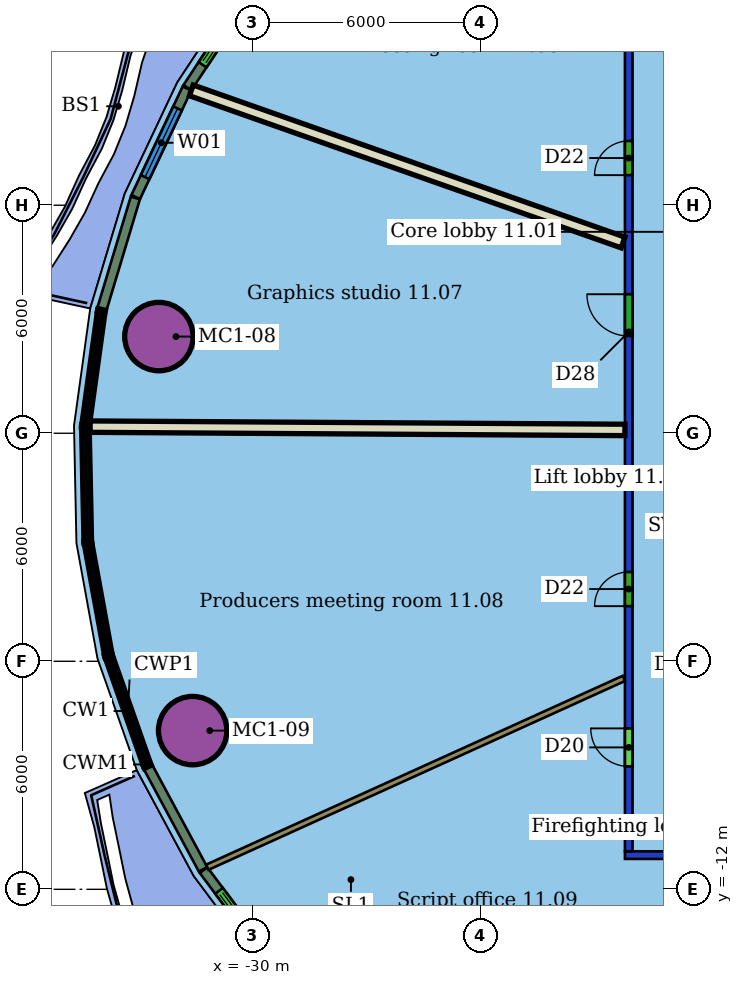
"""IFC4 building model, lengths in metres.
Left out: names, types, materials, properties, quantities, classifications, styles, units other than length and angle.
Written with IfcOpenShell. Run it as: python <this file> out.ifc"""

import sys

from ifc_helpers import new_model, si_unit, direction, frame, frame_2d, origin, origin_2d, place, context, subcontext, project, spatial, rectangle, hollow_circle, extrude, element, fill, save


model = new_model("IFC4")
c1 = context("Model", 3, precision=1e-05, world=origin(), true_north=direction((0.0, 1.0)))
c2 = subcontext(c1, "Body", "Model", "MODEL_VIEW")
j1 = project(units=[si_unit("LENGTHUNIT", "METRE"), si_unit("PLANEANGLEUNIT", "RADIAN")], contexts=[c1])
p1 = place(None, origin())
s1 = spatial("IfcSite", under=j1, at=p1, CompositionType="ELEMENT")
p2 = place(p1, origin())
s2 = spatial("IfcBuilding", under=s1, at=p2, CompositionType="ELEMENT")
p3 = place(p2, frame((0.0, 0.0, 58.2)))
s3 = spatial("IfcBuildingStorey", under=s2, at=p3, CompositionType="ELEMENT", Elevation=58.2)
for number, where, z_axis, x_axis in (
    (1, (-32.464, 2.543, 0.0), (0.0, 0.0, 1.0), (1.0, 0.0, 0.0)),
    (2, (-31.575, -7.824, 0.0), (0.0, 0.0, 1.0), (1.0, 0.0, 0.0)),
):
    element("IfcColumn", number, at=place(p3, frame(where, z_axis=z_axis, x_axis=x_axis)), inside=s3, PredefinedType="COLUMN", context=c2, shape_type="SweptSolid", body=[
        extrude(hollow_circle(Radius=0.9, WallThickness=0.06, at=origin_2d()), origin(), (0.0, 0.0, 1.0), 3.55),
    ])
p4 = place(p3, frame((8.2, -11.1, 0.0), z_axis=(0.0, 0.0, 1.0), x_axis=(-1.0, 0.0, 0.0)))
e3 = element("IfcWall", 3, at=p4, inside=s3, PredefinedType="PARTITIONING", context=c2, shape_type="SweptSolid", body=[
    extrude(rectangle(XDim=28.4, YDim=0.2, at=frame_2d((14.2, 0.0))), origin(), (0.0, 0.0, 1.0), 2.85),
])
p5 = place(p4, frame((20.481, 0.0, 0.0)))
e4 = element("IfcOpeningElement", 4, at=p5, cuts=e3, PredefinedType="OPENING", context=c2, shape_type="SweptSolid", body=[
    extrude(rectangle(XDim=1.1, YDim=2.1, at=frame_2d((0.55, 1.05))), frame((0.0, 0.11, 0.0), z_axis=(0.0, -1.0, 0.0), x_axis=(1.0, 0.0, 0.0)), (0.0, 0.0, 1.0), 0.22),
])
p6 = place(p4, frame((15.652, 0.0, 0.0)))
e5 = element("IfcOpeningElement", 5, at=p6, cuts=e3, PredefinedType="OPENING", context=c2, shape_type="SweptSolid", body=[
    extrude(rectangle(XDim=1.5, YDim=2.1, at=frame_2d((0.75, 1.05))), frame((0.0, 0.11, 0.0), z_axis=(0.0, -1.0, 0.0), x_axis=(1.0, 0.0, 0.0)), (0.0, 0.0, 1.0), 0.22),
])
p7 = place(p4, frame((7.719, 0.0, 0.0)))
e6 = element("IfcOpeningElement", 6, at=p7, cuts=e3, PredefinedType="OPENING", context=c2, shape_type="SweptSolid", body=[
    extrude(rectangle(XDim=1.8, YDim=2.1, at=frame_2d((0.9, 1.05))), frame((0.0, 0.11, 0.0), z_axis=(0.0, -1.0, 0.0), x_axis=(1.0, 0.0, 0.0)), (0.0, 0.0, 1.0), 0.22),
])
p8 = place(p3, frame((-20.1, -11.0, 0.0), z_axis=(0.0, 0.0, 1.0), x_axis=(0.0, 1.0, 0.0)))
e7 = element("IfcWall", 7, at=p8, inside=s3, PredefinedType="PARTITIONING", context=c2, shape_type="SweptSolid", body=[
    extrude(rectangle(XDim=22.0, YDim=0.2, at=frame_2d((11.0, 0.0))), origin(), (0.0, 0.0, 1.0), 2.85),
])
p9 = place(p8, frame((17.792, 0.0, 0.0)))
e8 = element("IfcOpeningElement", 8, at=p9, cuts=e7, PredefinedType="OPENING", context=c2, shape_type="SweptSolid", body=[
    extrude(rectangle(XDim=0.9, YDim=2.1, at=frame_2d((0.45, 1.05))), frame((0.0, 0.11, 0.0), z_axis=(0.0, -1.0, 0.0), x_axis=(1.0, 0.0, 0.0)), (0.0, 0.0, 1.0), 0.22),
])
p10 = place(p8, frame((13.558, 0.0, 0.0)))
e9 = element("IfcOpeningElement", 9, at=p10, cuts=e7, PredefinedType="OPENING", context=c2, shape_type="SweptSolid", body=[
    extrude(rectangle(XDim=1.1, YDim=2.1, at=frame_2d((0.55, 1.05))), frame((0.0, 0.11, 0.0), z_axis=(0.0, -1.0, 0.0), x_axis=(1.0, 0.0, 0.0)), (0.0, 0.0, 1.0), 0.22),
])
p11 = place(p8, frame((6.45, 0.0, 0.0)))
e10 = element("IfcOpeningElement", 10, at=p11, cuts=e7, PredefinedType="OPENING", context=c2, shape_type="SweptSolid", body=[
    extrude(rectangle(XDim=0.9, YDim=2.1, at=frame_2d((0.45, 1.05))), frame((0.0, 0.11, 0.0), z_axis=(0.0, -1.0, 0.0), x_axis=(1.0, 0.0, 0.0)), (0.0, 0.0, 1.0), 0.22),
])
p12 = place(p8, frame((2.234, 0.0, 0.0)))
e11 = element("IfcOpeningElement", 11, at=p12, cuts=e7, PredefinedType="OPENING", context=c2, shape_type="SweptSolid", body=[
    extrude(rectangle(XDim=1.0, YDim=2.1, at=frame_2d((0.5, 1.05))), frame((0.0, 0.11, 0.0), z_axis=(0.0, -1.0, 0.0), x_axis=(1.0, 0.0, 0.0)), (0.0, 0.0, 1.0), 0.22),
])
p13 = place(p3, frame((-31.611, 9.022, 0.0), z_axis=(0.0, 0.0, 1.0), x_axis=(0.943188110721, -0.332259217773, 0.0)))
e12 = element("IfcWall", 12, at=p13, inside=s3, PredefinedType="PARTITIONING", context=c2, shape_type="SweptSolid", body=[
    extrude(rectangle(XDim=12.045, YDim=0.3, at=frame_2d((6.023, 0.0))), origin(), (0.0, 0.0, 1.0), 3.55),
])
p14 = place(p3, frame((-34.274, 0.174, 0.0), z_axis=(0.0, 0.0, 1.0), x_axis=(0.999981035724, -0.006158586928, 0.0)))
e13 = element("IfcWall", 13, at=p14, inside=s3, PredefinedType="PARTITIONING", context=c2, shape_type="SweptSolid", body=[
    extrude(rectangle(XDim=14.073, YDim=0.3, at=frame_2d((7.037, 0.0))), origin(), (0.0, 0.0, 1.0), 3.55),
])
p15 = place(p3, frame((-31.19, -11.419, 0.0), z_axis=(0.0, 0.0, 1.0), x_axis=(0.91079054679, 0.412868719907, 0.0)))
e14 = element("IfcWall", 14, at=p15, inside=s3, PredefinedType="PARTITIONING", context=c2, shape_type="SweptSolid", body=[
    extrude(rectangle(XDim=12.033, YDim=0.15, at=frame_2d((6.017, 0.0))), origin(), (0.0, 0.0, 1.0), 3.55),
])
p16 = place(p3, frame((-24.339, -18.28, 0.0), z_axis=(0.0, 0.0, 1.0), x_axis=(0.708242772836, 0.705968961588, 0.0)))
e15 = element("IfcWall", 15, at=p16, inside=s3, PredefinedType="PARTITIONING", context=c2, shape_type="SweptSolid", body=[
    extrude(rectangle(XDim=9.878, YDim=0.3, at=frame_2d((4.939, 0.0))), origin(), (0.0, 0.0, 1.0), 3.55),
])
p17 = place(p3, frame((-29.926, 11.8, 0.0), z_axis=(0.0, 0.0, 1.0), x_axis=(-0.550976461362, -0.834520784058, 0.0)))
e16 = element("IfcWall", 16, at=p17, inside=s3, PredefinedType="SOLIDWALL", context=c2, shape_type="SweptSolid", body=[
    extrude(rectangle(XDim=3.243, YDim=0.25, at=frame_2d((1.621, 0.0))), origin(), (0.0, 0.0, 1.0), 3.15),
])
p18 = place(p17, frame((0.721, 0.0, 0.0)))
e17 = element("IfcOpeningElement", 17, at=p18, cuts=e16, PredefinedType="OPENING", context=c2, shape_type="SweptSolid", body=[
    extrude(rectangle(XDim=1.8, YDim=2.4, at=frame_2d((0.9, 1.2))), frame((0.0, 0.135, 0.0), z_axis=(0.0, -1.0, 0.0), x_axis=(1.0, 0.0, 0.0)), (0.0, 0.0, 1.0), 0.27),
])
p19 = place(p3, frame((-31.725, 9.072, 0.0), z_axis=(0.0, 0.0, 1.0), x_axis=(-0.427069496555, -0.904218803781, 0.0)))
e18 = element("IfcWall", 18, at=p19, inside=s3, PredefinedType="SOLIDWALL", context=c2, shape_type="SweptSolid", body=[
    extrude(rectangle(XDim=3.159, YDim=0.25, at=frame_2d((1.58, 0.0))), origin(), (0.0, 0.0, 1.0), 3.15),
])
p20 = place(p19, frame((0.58, 0.0, 0.8)))
e19 = element("IfcOpeningElement", 19, at=p20, cuts=e18, PredefinedType="OPENING", context=c2, shape_type="SweptSolid", body=[
    extrude(rectangle(XDim=2.0, YDim=2.2, at=frame_2d((1.0, 1.1))), frame((0.0, 0.135, 0.0), z_axis=(0.0, -1.0, 0.0), x_axis=(1.0, 0.0, 0.0)), (0.0, 0.0, 1.0), 0.27),
])
p21 = place(p3, frame((-33.084, 6.19, 0.0), z_axis=(0.0, 0.0, 1.0), x_axis=(-0.28804594388, -0.957616590403, 0.0)))
e20 = element("IfcWall", 20, at=p21, inside=s3, PredefinedType="SOLIDWALL", context=c2, shape_type="SweptSolid", body=[
    extrude(rectangle(XDim=3.048, YDim=0.25, at=frame_2d((1.524, 0.0))), origin(), (0.0, 0.0, 1.0), 3.15),
])
p22 = place(p3, frame((-32.745, -8.79, 0.0), z_axis=(0.0, 0.0, 1.0), x_axis=(0.473545649415, -0.880769276213, 0.0)))
e21 = element("IfcWall", 21, at=p22, inside=s3, PredefinedType="SOLIDWALL", context=c2, shape_type="SweptSolid", body=[
    extrude(rectangle(XDim=3.048, YDim=0.25, at=frame_2d((1.524, 0.0))), origin(), (0.0, 0.0, 1.0), 3.15),
])
p23 = place(p3, frame((-31.288, -11.497, 0.0), z_axis=(0.0, 0.0, 1.0), x_axis=(0.59907224047, -0.800694979813, 0.0)))
e22 = element("IfcWall", 22, at=p23, inside=s3, PredefinedType="SOLIDWALL", context=c2, shape_type="SweptSolid", body=[
    extrude(rectangle(XDim=3.159, YDim=0.25, at=frame_2d((1.58, 0.0))), origin(), (0.0, 0.0, 1.0), 3.15),
])
p24 = place(p23, frame((0.68, 0.0, 0.0)))
e23 = element("IfcOpeningElement", 23, at=p24, cuts=e22, PredefinedType="OPENING", context=c2, shape_type="SweptSolid", body=[
    extrude(rectangle(XDim=1.8, YDim=2.4, at=frame_2d((0.9, 1.2))), frame((0.0, 0.135, 0.0), z_axis=(0.0, -1.0, 0.0), x_axis=(1.0, 0.0, 0.0)), (0.0, 0.0, 1.0), 0.27),
])
p25 = place(p9, origin())
e24 = element("IfcDoor", 24, at=p25, inside=s3, OperationType="SINGLE_SWING_LEFT", PredefinedType="DOOR", context=c2, shape_type="SweptSolid", body=[
    extrude(rectangle(XDim=0.9, YDim=2.1, at=frame_2d((0.45, 1.05))), frame((0.0, 0.025, 0.0), z_axis=(0.0, -1.0, 0.0), x_axis=(1.0, 0.0, 0.0)), (0.0, 0.0, 1.0), 0.05),
])
fill(e8, e24)
p26 = place(p10, origin())
e25 = element("IfcDoor", 25, at=p26, inside=s3, OperationType="SINGLE_SWING_RIGHT", PredefinedType="DOOR", context=c2, shape_type="SweptSolid", body=[
    extrude(rectangle(XDim=1.1, YDim=2.1, at=frame_2d((0.55, 1.05))), frame((0.0, 0.025, 0.0), z_axis=(0.0, -1.0, 0.0), x_axis=(1.0, 0.0, 0.0)), (0.0, 0.0, 1.0), 0.05),
])
fill(e9, e25)
p27 = place(p11, origin())
e26 = element("IfcDoor", 26, at=p27, inside=s3, OperationType="SINGLE_SWING_LEFT", PredefinedType="DOOR", context=c2, shape_type="SweptSolid", body=[
    extrude(rectangle(XDim=0.9, YDim=2.1, at=frame_2d((0.45, 1.05))), frame((0.0, 0.025, 0.0), z_axis=(0.0, -1.0, 0.0), x_axis=(1.0, 0.0, 0.0)), (0.0, 0.0, 1.0), 0.05),
])
fill(e10, e26)
p28 = place(p12, origin())
e27 = element("IfcDoor", 27, at=p28, inside=s3, OperationType="SINGLE_SWING_RIGHT", PredefinedType="DOOR", context=c2, shape_type="SweptSolid", body=[
    extrude(rectangle(XDim=1.0, YDim=2.1, at=frame_2d((0.5, 1.05))), frame((0.0, 0.025, 0.0), z_axis=(0.0, -1.0, 0.0), x_axis=(1.0, 0.0, 0.0)), (0.0, 0.0, 1.0), 0.05),
])
fill(e11, e27)
p29 = place(p18, origin())
e28 = element("IfcDoor", 28, at=p29, inside=s3, OperationType="DOUBLE_DOOR_SLIDING", PredefinedType="DOOR", context=c2, shape_type="SweptSolid", body=[
    extrude(rectangle(XDim=1.8, YDim=2.4, at=frame_2d((0.9, 1.2))), frame((0.0, 0.025, 0.0), z_axis=(0.0, -1.0, 0.0), x_axis=(1.0, 0.0, 0.0)), (0.0, 0.0, 1.0), 0.05),
])
fill(e17, e28)
p30 = place(p20, origin())
e29 = element("IfcWindow", 29, at=p30, inside=s3, PartitioningType="SINGLE_PANEL", PredefinedType="WINDOW", context=c2, shape_type="SweptSolid", body=[
    extrude(rectangle(XDim=2.0, YDim=2.2, at=frame_2d((1.0, 1.1))), frame((0.0, 0.03, 0.0), z_axis=(0.0, -1.0, 0.0), x_axis=(1.0, 0.0, 0.0)), (0.0, 0.0, 1.0), 0.06),
])
fill(e19, e29)
p31 = place(p24, origin())
e30 = element("IfcDoor", 30, at=p31, inside=s3, OperationType="DOUBLE_DOOR_SLIDING", PredefinedType="DOOR", context=c2, shape_type="SweptSolid", body=[
    extrude(rectangle(XDim=1.8, YDim=2.4, at=frame_2d((0.9, 1.2))), frame((0.0, 0.025, 0.0), z_axis=(0.0, -1.0, 0.0), x_axis=(1.0, 0.0, 0.0)), (0.0, 0.0, 1.0), 0.05),
])
fill(e23, e30)
save(model, sys.argv[1])
